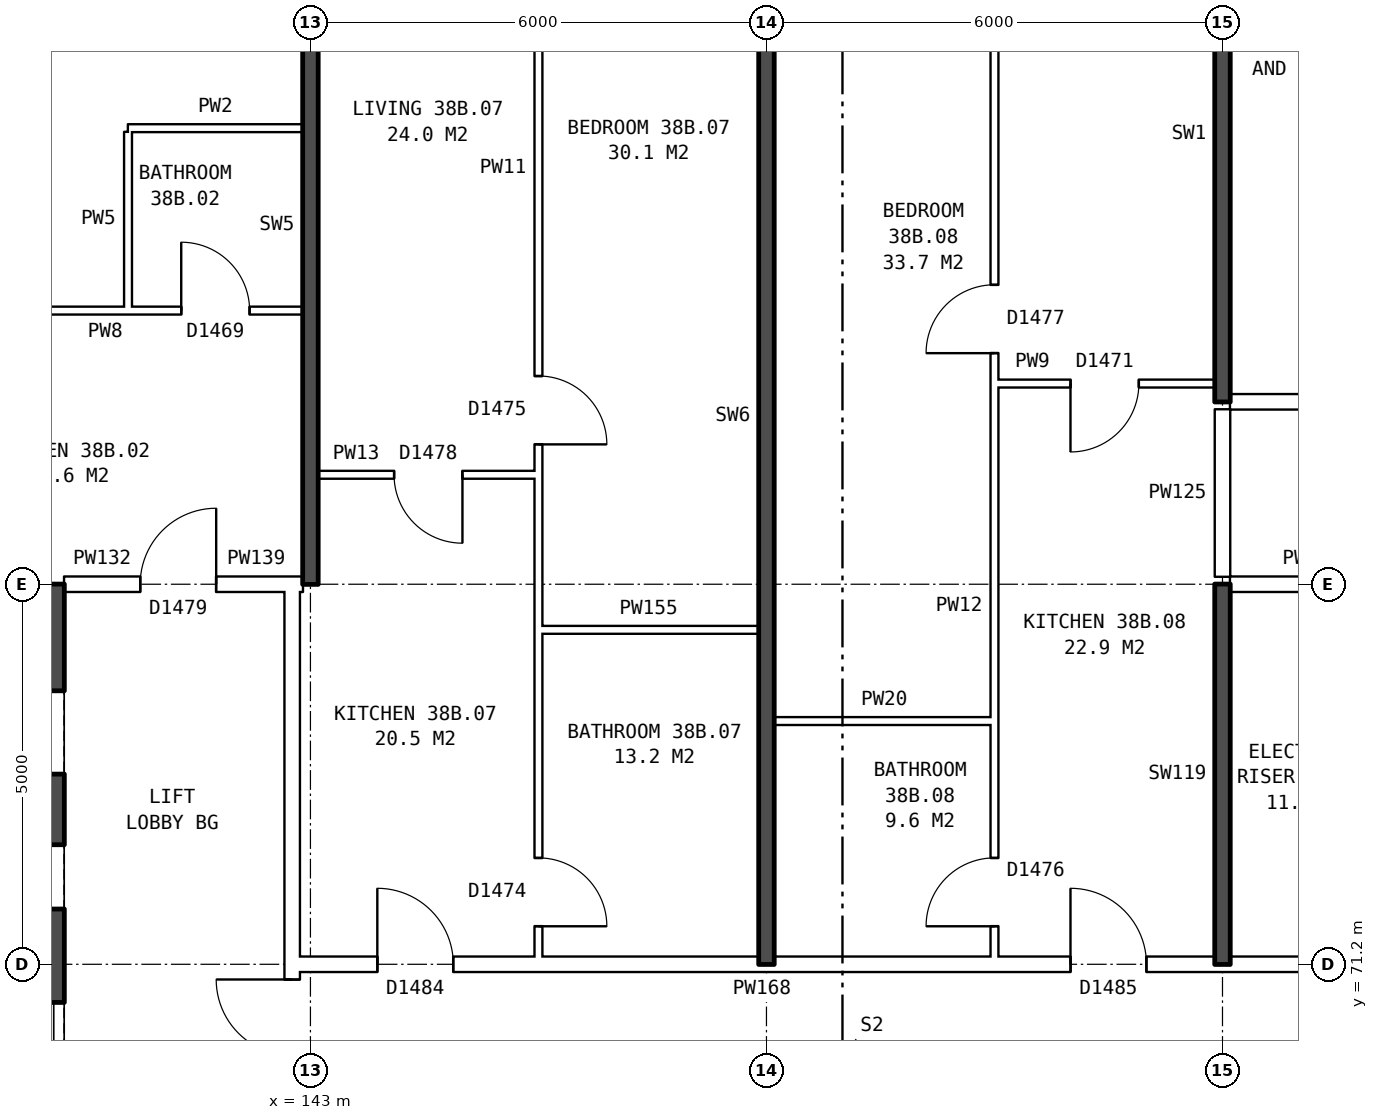
"""IFC4 building model, lengths in metres.
Left out: names, types, materials, properties, quantities, classifications, styles, units other than length and angle.
Written with IfcOpenShell. Run it as: python <this file> out.ifc"""

import sys

from ifc_helpers import new_model, si_unit, direction, frame, frame_2d, origin, place, context, subcontext, project, spatial, rectangle, extrude, element, fill, save


model = new_model("IFC4")
c1 = context("Model", 3, precision=1e-05, world=origin(), true_north=direction((0.0, 1.0)))
c2 = subcontext(c1, "Body", "Model", "MODEL_VIEW")
j1 = project(units=[si_unit("LENGTHUNIT", "METRE"), si_unit("PLANEANGLEUNIT", "RADIAN")], contexts=[c1])
p1 = place(None, origin())
s1 = spatial("IfcSite", under=j1, at=p1, CompositionType="ELEMENT")
p2 = place(p1, origin())
s2 = spatial("IfcBuilding", under=s1, at=p2, CompositionType="ELEMENT")
p3 = place(p2, frame((0.0, 0.0, 136.1)))
s3 = spatial("IfcBuildingStorey", under=s2, at=p3, CompositionType="ELEMENT", Elevation=136.1)
p4 = place(p3, frame((139.485, 63.8, 0.0), z_axis=(0.0, 0.0, 1.0), x_axis=(0.0, 1.0, 0.0)))
e1 = element("IfcWall", 1, at=p4, inside=s3, PredefinedType="SHEAR", context=c2, shape_type="SweptSolid", body=[
    extrude(rectangle(XDim=12.4, YDim=0.55, at=frame_2d((6.2, 0.0))), origin(), (0.0, 0.0, 1.0), 2.85),
])
p5 = place(p4, frame((1.325, 0.0, 0.0)))
e2 = element("IfcOpeningElement", 2, at=p5, cuts=e1, PredefinedType="OPENING", context=c2, shape_type="SweptSolid", body=[
    extrude(rectangle(XDim=1.1, YDim=2.1, at=frame_2d((0.55, 1.05))), frame((0.0, 0.285, 0.0), z_axis=(0.0, -1.0, 0.0), x_axis=(1.0, 0.0, 0.0)), (0.0, 0.0, 1.0), 0.57),
])
p6 = place(p4, frame((3.6, 0.0, 0.0)))
e3 = element("IfcOpeningElement", 3, at=p6, cuts=e1, PredefinedType="OPENING", context=c2, shape_type="SweptSolid", body=[
    extrude(rectangle(XDim=1.1, YDim=2.1, at=frame_2d((0.55, 1.05))), frame((0.0, 0.285, 0.0), z_axis=(0.0, -1.0, 0.0), x_axis=(1.0, 0.0, 0.0)), (0.0, 0.0, 1.0), 0.57),
])
p7 = place(p4, frame((5.8, 0.0, 0.0)))
e4 = element("IfcOpeningElement", 4, at=p7, cuts=e1, PredefinedType="OPENING", context=c2, shape_type="SweptSolid", body=[
    extrude(rectangle(XDim=1.1, YDim=2.1, at=frame_2d((0.55, 1.05))), frame((0.0, 0.285, 0.0), z_axis=(0.0, -1.0, 0.0), x_axis=(1.0, 0.0, 0.0)), (0.0, 0.0, 1.0), 0.57),
])
p8 = place(p4, frame((9.9, 0.0, 0.0)))
e5 = element("IfcOpeningElement", 5, at=p8, cuts=e1, PredefinedType="OPENING", context=c2, shape_type="SweptSolid", body=[
    extrude(rectangle(XDim=1.1, YDim=2.1, at=frame_2d((0.55, 1.05))), frame((0.0, 0.285, 0.0), z_axis=(0.0, -1.0, 0.0), x_axis=(1.0, 0.0, 0.0)), (0.0, 0.0, 1.0), 0.57),
])
p9 = place(p4, frame((8.125, 0.0, 0.0)))
e6 = element("IfcOpeningElement", 6, at=p9, cuts=e1, PredefinedType="OPENING", context=c2, shape_type="SweptSolid", body=[
    extrude(rectangle(XDim=0.85, YDim=2.1, at=frame_2d((0.425, 1.05))), frame((0.0, 0.285, 0.0), z_axis=(0.0, -1.0, 0.0), x_axis=(1.0, 0.0, 0.0)), (0.0, 0.0, 1.0), 0.57),
])
p10 = place(p3, frame((142.76, 63.9, 0.0), z_axis=(0.0, 0.0, 1.0), x_axis=(0.0, 1.0, 0.0)))
e7 = element("IfcWall", 7, at=p10, inside=s3, PredefinedType="PARTITIONING", context=c2, shape_type="SweptSolid", body=[
    extrude(rectangle(XDim=12.2, YDim=0.2, at=frame_2d((6.1, 0.0))), origin(), (0.0, 0.0, 1.0), 2.85),
])
p11 = place(p10, frame((5.1, 0.0, 0.0)))
e8 = element("IfcOpeningElement", 8, at=p11, cuts=e7, PredefinedType="OPENING", context=c2, shape_type="SweptSolid", body=[
    extrude(rectangle(XDim=2.0, YDim=2.1, at=frame_2d((1.0, 1.05))), frame((0.0, 0.11, 0.0), z_axis=(0.0, -1.0, 0.0), x_axis=(1.0, 0.0, 0.0)), (0.0, 0.0, 1.0), 0.22),
])
p12 = place(p3, frame((142.76, 71.2, 0.0), z_axis=(0.0, 0.0, 1.0), x_axis=(1.0, 0.0, 0.0)))
e9 = element("IfcWall", 9, at=p12, inside=s3, PredefinedType="PARTITIONING", context=c2, shape_type="SweptSolid", body=[
    extrude(rectangle(XDim=14.48, YDim=0.2, at=frame_2d((7.24, 0.0))), origin(), (0.0, 0.0, 1.0), 2.85),
])
p13 = place(p12, frame((1.12, 0.0, 0.0)))
e10 = element("IfcOpeningElement", 10, at=p13, cuts=e9, PredefinedType="OPENING", context=c2, shape_type="SweptSolid", body=[
    extrude(rectangle(XDim=1.0, YDim=2.1, at=frame_2d((0.5, 1.05))), frame((0.0, 0.11, 0.0), z_axis=(0.0, -1.0, 0.0), x_axis=(1.0, 0.0, 0.0)), (0.0, 0.0, 1.0), 0.22),
])
p14 = place(p12, frame((10.24, 0.0, 0.0)))
e11 = element("IfcOpeningElement", 11, at=p14, cuts=e9, PredefinedType="OPENING", context=c2, shape_type="SweptSolid", body=[
    extrude(rectangle(XDim=1.0, YDim=2.1, at=frame_2d((0.5, 1.05))), frame((0.0, 0.11, 0.0), z_axis=(0.0, -1.0, 0.0), x_axis=(1.0, 0.0, 0.0)), (0.0, 0.0, 1.0), 0.22),
])
for number, where, z_axis, x_axis in (
    (12, (149.1, 74.4, 0.0), (0.0, 0.0, 1.0), (1.0, 0.0, 0.0)),
    (13, (146.0, 75.6, 0.0), (0.0, 0.0, 1.0), (1.0, 0.0, 0.0)),
):
    element("IfcWall", number, at=place(p3, frame(where, z_axis=z_axis, x_axis=x_axis)), inside=s3, PredefinedType="PARTITIONING", context=c2, shape_type="SweptSolid", body=[
        extrude(rectangle(XDim=2.9, YDim=0.1, at=frame_2d((1.45, 0.0))), origin(), (0.0, 0.0, 1.0), 2.85),
    ])
p15 = place(p3, frame((139.76, 76.2, 0.0), z_axis=(0.0, 0.0, 1.0), x_axis=(1.0, 0.0, 0.0)))
e14 = element("IfcWall", 14, at=p15, inside=s3, PredefinedType="PARTITIONING", context=c2, shape_type="SweptSolid", body=[
    extrude(rectangle(XDim=3.0, YDim=0.2, at=frame_2d((1.5, 0.0))), origin(), (0.0, 0.0, 1.0), 2.85),
])
p16 = place(p15, frame((1.0, 0.0, 0.0)))
e15 = element("IfcOpeningElement", 15, at=p16, cuts=e14, PredefinedType="OPENING", context=c2, shape_type="SweptSolid", body=[
    extrude(rectangle(XDim=1.0, YDim=2.1, at=frame_2d((0.5, 1.05))), frame((0.0, 0.11, 0.0), z_axis=(0.0, -1.0, 0.0), x_axis=(1.0, 0.0, 0.0)), (0.0, 0.0, 1.0), 0.22),
])
p17 = place(p3, frame((142.76, 76.2, 0.0), z_axis=(0.0, 0.0, 1.0), x_axis=(1.0, 0.0, 0.0)))
e16 = element("IfcWall", 16, at=p17, inside=s3, PredefinedType="PARTITIONING", context=c2, shape_type="SweptSolid", body=[
    extrude(rectangle(XDim=0.14, YDim=0.2, at=frame_2d((0.07, 0.0))), origin(), (0.0, 0.0, 1.0), 2.85),
])
p18 = place(p3, frame((155.1, 76.2, 0.0), z_axis=(0.0, 0.0, 1.0), x_axis=(1.0, 0.0, 0.0)))
e17 = element("IfcWall", 17, at=p18, inside=s3, PredefinedType="PARTITIONING", context=c2, shape_type="SweptSolid", body=[
    extrude(rectangle(XDim=2.14, YDim=0.2, at=frame_2d((1.07, 0.0))), origin(), (0.0, 0.0, 1.0), 2.85),
])
p19 = place(p3, frame((143.1, 77.64, 0.0), z_axis=(0.0, 0.0, 1.0), x_axis=(1.0, 0.0, 0.0)))
e18 = element("IfcWall", 18, at=p19, inside=s3, PredefinedType="PARTITIONING", context=c2, shape_type="SweptSolid", body=[
    extrude(rectangle(XDim=2.9, YDim=0.1, at=frame_2d((1.45, 0.0))), origin(), (0.0, 0.0, 1.0), 2.85),
])
p20 = place(p19, frame((1.0, 0.0, 0.0)))
e19 = element("IfcOpeningElement", 19, at=p20, cuts=e18, PredefinedType="OPENING", context=c2, shape_type="SweptSolid", body=[
    extrude(rectangle(XDim=0.9, YDim=2.1, at=frame_2d((0.45, 1.05))), frame((0.0, 0.06, 0.0), z_axis=(0.0, -1.0, 0.0), x_axis=(1.0, 0.0, 0.0)), (0.0, 0.0, 1.0), 0.12),
])
p21 = place(p3, frame((155.1, 78.6, 0.0), z_axis=(0.0, 0.0, 1.0), x_axis=(1.0, 0.0, 0.0)))
e20 = element("IfcWall", 20, at=p21, inside=s3, PredefinedType="PARTITIONING", context=c2, shape_type="SweptSolid", body=[
    extrude(rectangle(XDim=17.29, YDim=0.2, at=frame_2d((8.645, 0.0))), origin(), (0.0, 0.0, 1.0), 2.85),
])
p22 = place(p21, frame((1.45, 0.0, 0.0)))
e21 = element("IfcOpeningElement", 21, at=p22, cuts=e20, PredefinedType="OPENING", context=c2, shape_type="SweptSolid", body=[
    extrude(rectangle(XDim=1.0, YDim=2.1, at=frame_2d((0.5, 1.05))), frame((0.0, 0.11, 0.0), z_axis=(0.0, -1.0, 0.0), x_axis=(1.0, 0.0, 0.0)), (0.0, 0.0, 1.0), 0.22),
])
p23 = place(p21, frame((8.4, 0.0, 0.0)))
e22 = element("IfcOpeningElement", 22, at=p23, cuts=e20, PredefinedType="OPENING", context=c2, shape_type="SweptSolid", body=[
    extrude(rectangle(XDim=1.0, YDim=2.1, at=frame_2d((0.5, 1.05))), frame((0.0, 0.11, 0.0), z_axis=(0.0, -1.0, 0.0), x_axis=(1.0, 0.0, 0.0)), (0.0, 0.0, 1.0), 0.22),
])
p24 = place(p3, frame((152.0, 78.84, 0.0), z_axis=(0.0, 0.0, 1.0), x_axis=(1.0, 0.0, 0.0)))
e23 = element("IfcWall", 23, at=p24, inside=s3, PredefinedType="PARTITIONING", context=c2, shape_type="SweptSolid", body=[
    extrude(rectangle(XDim=2.9, YDim=0.1, at=frame_2d((1.45, 0.0))), origin(), (0.0, 0.0, 1.0), 2.85),
])
p25 = place(p24, frame((1.0, 0.0, 0.0)))
e24 = element("IfcOpeningElement", 24, at=p25, cuts=e23, PredefinedType="OPENING", context=c2, shape_type="SweptSolid", body=[
    extrude(rectangle(XDim=0.9, YDim=2.1, at=frame_2d((0.45, 1.05))), frame((0.0, 0.06, 0.0), z_axis=(0.0, -1.0, 0.0), x_axis=(1.0, 0.0, 0.0)), (0.0, 0.0, 1.0), 0.12),
])
p26 = place(p3, frame((137.1, 79.8, 0.0), z_axis=(0.0, 0.0, 1.0), x_axis=(1.0, 0.0, 0.0)))
e25 = element("IfcWall", 25, at=p26, inside=s3, PredefinedType="PARTITIONING", context=c2, shape_type="SweptSolid", body=[
    extrude(rectangle(XDim=5.8, YDim=0.1, at=frame_2d((2.9, 0.0))), origin(), (0.0, 0.0, 1.0), 2.85),
])
p27 = place(p26, frame((1.3, 0.0, 0.0)))
e26 = element("IfcOpeningElement", 26, at=p27, cuts=e25, PredefinedType="OPENING", context=c2, shape_type="SweptSolid", body=[
    extrude(rectangle(XDim=0.9, YDim=2.1, at=frame_2d((0.45, 1.05))), frame((0.0, 0.06, 0.0), z_axis=(0.0, -1.0, 0.0), x_axis=(1.0, 0.0, 0.0)), (0.0, 0.0, 1.0), 0.12),
])
p28 = place(p26, frame((4.2, 0.0, 0.0)))
e27 = element("IfcOpeningElement", 27, at=p28, cuts=e25, PredefinedType="OPENING", context=c2, shape_type="SweptSolid", body=[
    extrude(rectangle(XDim=0.9, YDim=2.1, at=frame_2d((0.45, 1.05))), frame((0.0, 0.06, 0.0), z_axis=(0.0, -1.0, 0.0), x_axis=(1.0, 0.0, 0.0)), (0.0, 0.0, 1.0), 0.12),
])
for number, where, z_axis, x_axis in (
    (28, (140.6, 82.2, 0.0), (0.0, 0.0, 1.0), (1.0, 0.0, 0.0)),
    (29, (140.6, 79.85, 0.0), (0.0, 0.0, 1.0), (0.0, 1.0, 0.0)),
):
    element("IfcWall", number, at=place(p3, frame(where, z_axis=z_axis, x_axis=x_axis)), inside=s3, PredefinedType="PARTITIONING", context=c2, shape_type="SweptSolid", body=[
        extrude(rectangle(XDim=2.3, YDim=0.1, at=frame_2d((1.15, 0.0))), origin(), (0.0, 0.0, 1.0), 2.85),
    ])
p29 = place(p3, frame((143.0, 76.2, 0.0), z_axis=(0.0, 0.0, 1.0), x_axis=(0.0, 1.0, 0.0)))
e30 = element("IfcWall", 30, at=p29, inside=s3, PredefinedType="SOLIDWALL", context=c2, shape_type="SweptSolid", body=[
    extrude(rectangle(XDim=9.44, YDim=0.2, at=frame_2d((4.72, 0.0))), origin(), (0.0, 0.0, 1.0), 2.85),
])
p30 = place(p3, frame((146.0, 71.3, 0.0), z_axis=(0.0, 0.0, 1.0), x_axis=(0.0, 1.0, 0.0)))
e31 = element("IfcWall", 31, at=p30, inside=s3, PredefinedType="PARTITIONING", context=c2, shape_type="SweptSolid", body=[
    extrude(rectangle(XDim=14.34, YDim=0.1, at=frame_2d((7.17, 0.0))), origin(), (0.0, 0.0, 1.0), 2.85),
])
p31 = place(p30, frame((6.74, 0.0, 0.0)))
e32 = element("IfcOpeningElement", 32, at=p31, cuts=e31, PredefinedType="OPENING", context=c2, shape_type="SweptSolid", body=[
    extrude(rectangle(XDim=0.9, YDim=2.1, at=frame_2d((0.45, 1.05))), frame((0.0, 0.06, 0.0), z_axis=(0.0, -1.0, 0.0), x_axis=(1.0, 0.0, 0.0)), (0.0, 0.0, 1.0), 0.12),
])
p32 = place(p30, frame((0.4, 0.0, 0.0)))
e33 = element("IfcOpeningElement", 33, at=p32, cuts=e31, PredefinedType="OPENING", context=c2, shape_type="SweptSolid", body=[
    extrude(rectangle(XDim=0.9, YDim=2.1, at=frame_2d((0.45, 1.05))), frame((0.0, 0.06, 0.0), z_axis=(0.0, -1.0, 0.0), x_axis=(1.0, 0.0, 0.0)), (0.0, 0.0, 1.0), 0.12),
])
p33 = place(p3, frame((149.0, 71.2, 0.0), z_axis=(0.0, 0.0, 1.0), x_axis=(0.0, 1.0, 0.0)))
e34 = element("IfcWall", 34, at=p33, inside=s3, PredefinedType="SOLIDWALL", context=c2, shape_type="SweptSolid", body=[
    extrude(rectangle(XDim=14.44, YDim=0.2, at=frame_2d((7.22, 0.0))), origin(), (0.0, 0.0, 1.0), 2.85),
])
p34 = place(p3, frame((152.0, 71.3, 0.0), z_axis=(0.0, 0.0, 1.0), x_axis=(0.0, 1.0, 0.0)))
e35 = element("IfcWall", 35, at=p34, inside=s3, PredefinedType="PARTITIONING", context=c2, shape_type="SweptSolid", body=[
    extrude(rectangle(XDim=14.34, YDim=0.1, at=frame_2d((7.17, 0.0))), origin(), (0.0, 0.0, 1.0), 2.85),
])
p35 = place(p34, frame((7.94, 0.0, 0.0)))
e36 = element("IfcOpeningElement", 36, at=p35, cuts=e35, PredefinedType="OPENING", context=c2, shape_type="SweptSolid", body=[
    extrude(rectangle(XDim=0.9, YDim=2.1, at=frame_2d((0.45, 1.05))), frame((0.0, 0.06, 0.0), z_axis=(0.0, -1.0, 0.0), x_axis=(1.0, 0.0, 0.0)), (0.0, 0.0, 1.0), 0.12),
])
p36 = place(p34, frame((0.4, 0.0, 0.0)))
e37 = element("IfcOpeningElement", 37, at=p36, cuts=e35, PredefinedType="OPENING", context=c2, shape_type="SweptSolid", body=[
    extrude(rectangle(XDim=0.9, YDim=2.1, at=frame_2d((0.45, 1.05))), frame((0.0, 0.06, 0.0), z_axis=(0.0, -1.0, 0.0), x_axis=(1.0, 0.0, 0.0)), (0.0, 0.0, 1.0), 0.12),
])
p37 = place(p3, frame((155.0, 71.2, 0.0), z_axis=(0.0, 0.0, 1.0), x_axis=(0.0, 1.0, 0.0)))
e38 = element("IfcWall", 38, at=p37, inside=s3, PredefinedType="SOLIDWALL", context=c2, shape_type="SweptSolid", body=[
    extrude(rectangle(XDim=5.0, YDim=0.2, at=frame_2d((2.5, 0.0))), origin(), (0.0, 0.0, 1.0), 2.85),
])
p38 = place(p3, frame((155.0, 76.3, 0.0), z_axis=(0.0, 0.0, 1.0), x_axis=(0.0, 1.0, 0.0)))
e39 = element("IfcWall", 39, at=p38, inside=s3, PredefinedType="PARTITIONING", context=c2, shape_type="SweptSolid", body=[
    extrude(rectangle(XDim=2.2, YDim=0.2, at=frame_2d((1.1, 0.0))), origin(), (0.0, 0.0, 1.0), 2.85),
])
p39 = place(p3, frame((155.0, 78.6, 0.0), z_axis=(0.0, 0.0, 1.0), x_axis=(0.0, 1.0, 0.0)))
e40 = element("IfcWall", 40, at=p39, inside=s3, PredefinedType="SOLIDWALL", context=c2, shape_type="SweptSolid", body=[
    extrude(rectangle(XDim=7.04, YDim=0.2, at=frame_2d((3.52, 0.0))), origin(), (0.0, 0.0, 1.0), 2.85),
])
p40 = place(p11, origin())
e41 = element("IfcDoor", 41, at=p40, inside=s3, OperationType="DOUBLE_DOOR_SINGLE_SWING", PredefinedType="DOOR", context=c2, shape_type="SweptSolid", body=[
    extrude(rectangle(XDim=2.0, YDim=2.1, at=frame_2d((1.0, 1.05))), frame((0.0, 0.025, 0.0), z_axis=(0.0, -1.0, 0.0), x_axis=(1.0, 0.0, 0.0)), (0.0, 0.0, 1.0), 0.05),
])
fill(e8, e41)
p41 = place(p16, origin())
e42 = element("IfcDoor", 42, at=p41, inside=s3, OperationType="SINGLE_SWING_RIGHT", PredefinedType="DOOR", context=c2, shape_type="SweptSolid", body=[
    extrude(rectangle(XDim=1.0, YDim=2.1, at=frame_2d((0.5, 1.05))), frame((0.0, 0.025, 0.0), z_axis=(0.0, -1.0, 0.0), x_axis=(1.0, 0.0, 0.0)), (0.0, 0.0, 1.0), 0.05),
])
fill(e15, e42)
p42 = place(p28, origin())
e43 = element("IfcDoor", 43, at=p42, inside=s3, OperationType="SINGLE_SWING_LEFT", PredefinedType="DOOR", context=c2, shape_type="SweptSolid", body=[
    extrude(rectangle(XDim=0.9, YDim=2.1, at=frame_2d((0.45, 1.05))), frame((0.0, 0.025, 0.0), z_axis=(0.0, -1.0, 0.0), x_axis=(1.0, 0.0, 0.0)), (0.0, 0.0, 1.0), 0.05),
])
fill(e27, e43)
p43 = place(p31, frame((0.9, 0.0, 0.0), z_axis=(0.0, 0.0, 1.0), x_axis=(-1.0, 0.0, 0.0)))
e44 = element("IfcDoor", 44, at=p43, inside=s3, OperationType="SINGLE_SWING_RIGHT", PredefinedType="DOOR", context=c2, shape_type="SweptSolid", body=[
    extrude(rectangle(XDim=0.9, YDim=2.1, at=frame_2d((0.45, 1.05))), frame((0.0, 0.025, 0.0), z_axis=(0.0, -1.0, 0.0), x_axis=(1.0, 0.0, 0.0)), (0.0, 0.0, 1.0), 0.05),
])
fill(e32, e44)
p44 = place(p13, origin())
e45 = element("IfcDoor", 45, at=p44, inside=s3, OperationType="SINGLE_SWING_LEFT", PredefinedType="DOOR", context=c2, shape_type="SweptSolid", body=[
    extrude(rectangle(XDim=1.0, YDim=2.1, at=frame_2d((0.5, 1.05))), frame((0.0, 0.025, 0.0), z_axis=(0.0, -1.0, 0.0), x_axis=(1.0, 0.0, 0.0)), (0.0, 0.0, 1.0), 0.05),
])
fill(e10, e45)
p45 = place(p20, frame((0.9, 0.0, 0.0), z_axis=(0.0, 0.0, 1.0), x_axis=(-1.0, 0.0, 0.0)))
e46 = element("IfcDoor", 46, at=p45, inside=s3, OperationType="SINGLE_SWING_LEFT", PredefinedType="DOOR", context=c2, shape_type="SweptSolid", body=[
    extrude(rectangle(XDim=0.9, YDim=2.1, at=frame_2d((0.45, 1.05))), frame((0.0, 0.025, 0.0), z_axis=(0.0, -1.0, 0.0), x_axis=(1.0, 0.0, 0.0)), (0.0, 0.0, 1.0), 0.05),
])
fill(e19, e46)
p46 = place(p32, frame((0.9, 0.0, 0.0), z_axis=(0.0, 0.0, 1.0), x_axis=(-1.0, 0.0, 0.0)))
e47 = element("IfcDoor", 47, at=p46, inside=s3, OperationType="SINGLE_SWING_RIGHT", PredefinedType="DOOR", context=c2, shape_type="SweptSolid", body=[
    extrude(rectangle(XDim=0.9, YDim=2.1, at=frame_2d((0.45, 1.05))), frame((0.0, 0.025, 0.0), z_axis=(0.0, -1.0, 0.0), x_axis=(1.0, 0.0, 0.0)), (0.0, 0.0, 1.0), 0.05),
])
fill(e33, e47)
p47 = place(p35, origin())
e48 = element("IfcDoor", 48, at=p47, inside=s3, OperationType="SINGLE_SWING_LEFT", PredefinedType="DOOR", context=c2, shape_type="SweptSolid", body=[
    extrude(rectangle(XDim=0.9, YDim=2.1, at=frame_2d((0.45, 1.05))), frame((0.0, 0.025, 0.0), z_axis=(0.0, -1.0, 0.0), x_axis=(1.0, 0.0, 0.0)), (0.0, 0.0, 1.0), 0.05),
])
fill(e36, e48)
p48 = place(p14, origin())
e49 = element("IfcDoor", 49, at=p48, inside=s3, OperationType="SINGLE_SWING_LEFT", PredefinedType="DOOR", context=c2, shape_type="SweptSolid", body=[
    extrude(rectangle(XDim=1.0, YDim=2.1, at=frame_2d((0.5, 1.05))), frame((0.0, 0.025, 0.0), z_axis=(0.0, -1.0, 0.0), x_axis=(1.0, 0.0, 0.0)), (0.0, 0.0, 1.0), 0.05),
])
fill(e11, e49)
p49 = place(p25, frame((0.9, 0.0, 0.0), z_axis=(0.0, 0.0, 1.0), x_axis=(-1.0, 0.0, 0.0)))
e50 = element("IfcDoor", 50, at=p49, inside=s3, OperationType="SINGLE_SWING_RIGHT", PredefinedType="DOOR", context=c2, shape_type="SweptSolid", body=[
    extrude(rectangle(XDim=0.9, YDim=2.1, at=frame_2d((0.45, 1.05))), frame((0.0, 0.025, 0.0), z_axis=(0.0, -1.0, 0.0), x_axis=(1.0, 0.0, 0.0)), (0.0, 0.0, 1.0), 0.05),
])
fill(e24, e50)
p50 = place(p36, origin())
e51 = element("IfcDoor", 51, at=p50, inside=s3, OperationType="SINGLE_SWING_LEFT", PredefinedType="DOOR", context=c2, shape_type="SweptSolid", body=[
    extrude(rectangle(XDim=0.9, YDim=2.1, at=frame_2d((0.45, 1.05))), frame((0.0, 0.025, 0.0), z_axis=(0.0, -1.0, 0.0), x_axis=(1.0, 0.0, 0.0)), (0.0, 0.0, 1.0), 0.05),
])
fill(e37, e51)
save(model, sys.argv[1])
